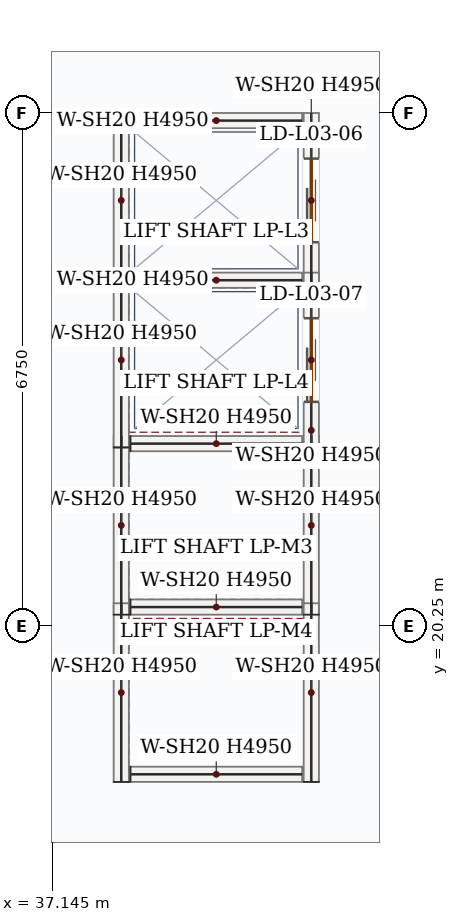
"""IFC4 building model, lengths in metres.
Left out: names, types, materials, properties, quantities, classifications, styles, units other than length and angle.
Written with IfcOpenShell. Run it as: python <this file> out.ifc"""

import sys

from ifc_helpers import new_model, si_unit, direction, frame, frame_2d, origin, place, context, subcontext, project, spatial, rectangle, extrude, source, transform, mapped, element, fill, save


model = new_model("IFC4")
c1 = context("Model", 3, precision=1e-05, world=origin(), true_north=direction((0.0, 1.0)))
c2 = subcontext(c1, "Body", "Model", "MODEL_VIEW")
j1 = project(units=[si_unit("LENGTHUNIT", "METRE"), si_unit("PLANEANGLEUNIT", "RADIAN")], contexts=[c1])
p1 = place(None, origin())
s1 = spatial("IfcSite", under=j1, at=p1, CompositionType="ELEMENT")
p2 = place(p1, origin())
s2 = spatial("IfcBuilding", under=s1, at=p2, CompositionType="ELEMENT")
p3 = place(p2, frame((0.0, 0.0, 18.0)))
s3 = spatial("IfcBuildingStorey", under=s2, at=p3, CompositionType="ELEMENT", Elevation=18.0)
m1 = source(origin(), c2, "Body", "SweptSolid", [
    extrude(rectangle(XDim=2.35, YDim=0.2, at=frame_2d((1.175, 0.0))), origin(), (0.0, 0.0, 1.0), 4.95),
])
for number, where, z_axis, x_axis in (
    (1, (38.05, 20.4, 0.0), (0.0, 0.0, 1.0), (0.0, 1.0, 0.0)),
    (2, (40.55, 20.4, 0.0), (0.0, 0.0, 1.0), (0.0, 1.0, 0.0)),
):
    element("IfcWall", number, at=place(p3, frame(where, z_axis=z_axis, x_axis=x_axis)), inside=s3, PredefinedType="SOLIDWALL", context=c2, shape_type="MappedRepresentation", body=[
        mapped(m1, transform((0.0, 0.0, 0.0), x_axis=(1.0, 0.0, 0.0), y_axis=(0.0, 1.0, 0.0), z_axis=(0.0, 0.0, 1.0), scale=1.0)),
    ])
m2 = source(origin(), c2, "Body", "SweptSolid", [
    extrude(rectangle(XDim=2.26, YDim=0.2, at=frame_2d((1.13, 0.0))), origin(), (0.0, 0.0, 1.0), 4.95),
])
for number, where, z_axis, x_axis in (
    (3, (38.17, 20.5, 0.0), (0.0, 0.0, 1.0), (1.0, 0.0, 0.0)),
    (4, (38.17, 22.65, 0.0), (0.0, 0.0, 1.0), (1.0, 0.0, 0.0)),
):
    element("IfcWall", number, at=place(p3, frame(where, z_axis=z_axis, x_axis=x_axis)), inside=s3, PredefinedType="SOLIDWALL", context=c2, shape_type="MappedRepresentation", body=[
        mapped(m2, transform((0.0, 0.0, 0.0), x_axis=(1.0, 0.0, 0.0), y_axis=(0.0, 1.0, 0.0), z_axis=(0.0, 0.0, 1.0), scale=1.0)),
    ])
for number, where, z_axis, x_axis in (
    (5, (38.05, 18.2, 0.0), (0.0, 0.0, 1.0), (0.0, 1.0, 0.0)),
    (6, (40.55, 18.2, 0.0), (0.0, 0.0, 1.0), (0.0, 1.0, 0.0)),
):
    element("IfcWall", number, at=place(p3, frame(where, z_axis=z_axis, x_axis=x_axis)), inside=s3, PredefinedType="SOLIDWALL", context=c2, shape_type="MappedRepresentation", body=[
        mapped(m1, transform((0.0, 0.0, 0.0), x_axis=(1.0, 0.0, 0.0), y_axis=(0.0, 1.0, 0.0), z_axis=(0.0, 0.0, 1.0), scale=1.0)),
    ])
p4 = place(p3, frame((38.17, 18.3, 0.0), z_axis=(0.0, 0.0, 1.0), x_axis=(1.0, 0.0, 0.0)))
e7 = element("IfcWall", 7, at=p4, inside=s3, PredefinedType="SOLIDWALL", context=c2, shape_type="MappedRepresentation", body=[
    mapped(m2, transform((0.0, 0.0, 0.0), x_axis=(1.0, 0.0, 0.0), y_axis=(0.0, 1.0, 0.0), z_axis=(0.0, 0.0, 1.0), scale=1.0)),
])
m3 = source(origin(), c2, "Body", "SweptSolid", [
    extrude(rectangle(XDim=2.3, YDim=0.2, at=frame_2d((1.15, 0.0))), origin(), (0.0, 0.0, 1.0), 4.95),
])
p5 = place(p3, frame((38.05, 24.7, 0.0), z_axis=(0.0, 0.0, 1.0), x_axis=(0.0, 1.0, 0.0)))
e8 = element("IfcWall", 8, at=p5, inside=s3, PredefinedType="SOLIDWALL", context=c2, shape_type="MappedRepresentation", body=[
    mapped(m3, transform((0.0, 0.0, 0.0), x_axis=(1.0, 0.0, 0.0), y_axis=(0.0, 1.0, 0.0), z_axis=(0.0, 0.0, 1.0), scale=1.0)),
])
p6 = place(p3, frame((40.55, 24.7, 0.0), z_axis=(0.0, 0.0, 1.0), x_axis=(0.0, 1.0, 0.0)))
e9 = element("IfcWall", 9, at=p6, inside=s3, PredefinedType="SOLIDWALL", context=c2, shape_type="SweptSolid", body=[
    extrude(rectangle(XDim=2.3, YDim=0.2, at=frame_2d((1.15, 0.0))), origin(), (0.0, 0.0, 1.0), 4.95),
])
p7 = place(p6, frame((0.6, 0.0, 0.0)))
e10 = element("IfcOpeningElement", 10, at=p7, cuts=e9, PredefinedType="OPENING", context=c2, shape_type="SweptSolid", body=[
    extrude(rectangle(XDim=1.1, YDim=2.15, at=frame_2d((0.55, 1.075))), frame((0.0, 0.11, 0.0), z_axis=(0.0, -1.0, 0.0), x_axis=(1.0, 0.0, 0.0)), (0.0, 0.0, 1.0), 0.22),
])
for number, where, z_axis, x_axis in (
    (11, (38.17, 24.8, 0.0), (0.0, 0.0, 1.0), (1.0, 0.0, 0.0)),
    (12, (38.17, 26.9, 0.0), (0.0, 0.0, 1.0), (1.0, 0.0, 0.0)),
):
    element("IfcWall", number, at=place(p3, frame(where, z_axis=z_axis, x_axis=x_axis)), inside=s3, PredefinedType="SOLIDWALL", context=c2, shape_type="MappedRepresentation", body=[
        mapped(m2, transform((0.0, 0.0, 0.0), x_axis=(1.0, 0.0, 0.0), y_axis=(0.0, 1.0, 0.0), z_axis=(0.0, 0.0, 1.0), scale=1.0)),
    ])
m4 = source(origin(), c2, "Body", "SweptSolid", [
    extrude(rectangle(XDim=2.3, YDim=0.2, at=frame_2d((1.15, 0.0))), origin(), (0.0, 0.0, 1.0), 4.95),
])
p8 = place(p3, frame((38.05, 22.6, 0.0), z_axis=(0.0, 0.0, 1.0), x_axis=(0.0, 1.0, 0.0)))
e13 = element("IfcWall", 13, at=p8, inside=s3, PredefinedType="SOLIDWALL", context=c2, shape_type="MappedRepresentation", body=[
    mapped(m4, transform((0.0, 0.0, 0.0), x_axis=(1.0, 0.0, 0.0), y_axis=(0.0, 1.0, 0.0), z_axis=(0.0, 0.0, 1.0), scale=1.0)),
])
p9 = place(p3, frame((40.55, 22.6, 0.0), z_axis=(0.0, 0.0, 1.0), x_axis=(0.0, 1.0, 0.0)))
e14 = element("IfcWall", 14, at=p9, inside=s3, PredefinedType="SOLIDWALL", context=c2, shape_type="SweptSolid", body=[
    extrude(rectangle(XDim=2.3, YDim=0.2, at=frame_2d((1.15, 0.0))), origin(), (0.0, 0.0, 1.0), 4.95),
])
p10 = place(p9, frame((0.6, 0.0, 0.0)))
e15 = element("IfcOpeningElement", 15, at=p10, cuts=e14, PredefinedType="OPENING", context=c2, shape_type="SweptSolid", body=[
    extrude(rectangle(XDim=1.1, YDim=2.15, at=frame_2d((0.55, 1.075))), frame((0.0, 0.11, 0.0), z_axis=(0.0, -1.0, 0.0), x_axis=(1.0, 0.0, 0.0)), (0.0, 0.0, 1.0), 0.22),
])
m5 = source(origin(), c2, "Body", "SweptSolid", [
    extrude(rectangle(XDim=1.1, YDim=2.15, at=frame_2d((0.55, 1.075))), frame((0.0, 0.025, 0.0), z_axis=(0.0, -1.0, 0.0), x_axis=(1.0, 0.0, 0.0)), (0.0, 0.0, 1.0), 0.05),
])
p11 = place(p7, origin())
e16 = element("IfcDoor", 16, at=p11, inside=s3, OperationType="DOUBLE_DOOR_SLIDING", PredefinedType="DOOR", context=c2, shape_type="MappedRepresentation", body=[
    mapped(m5, transform((0.0, 0.0, 0.0), x_axis=(1.0, 0.0, 0.0), y_axis=(0.0, 1.0, 0.0), z_axis=(0.0, 0.0, 1.0), scale=1.0)),
])
fill(e10, e16)
p12 = place(p10, origin())
e17 = element("IfcDoor", 17, at=p12, inside=s3, OperationType="DOUBLE_DOOR_SLIDING", PredefinedType="DOOR", context=c2, shape_type="MappedRepresentation", body=[
    mapped(m5, transform((0.0, 0.0, 0.0), x_axis=(1.0, 0.0, 0.0), y_axis=(0.0, 1.0, 0.0), z_axis=(0.0, 0.0, 1.0), scale=1.0)),
])
fill(e15, e17)
save(model, sys.argv[1])
